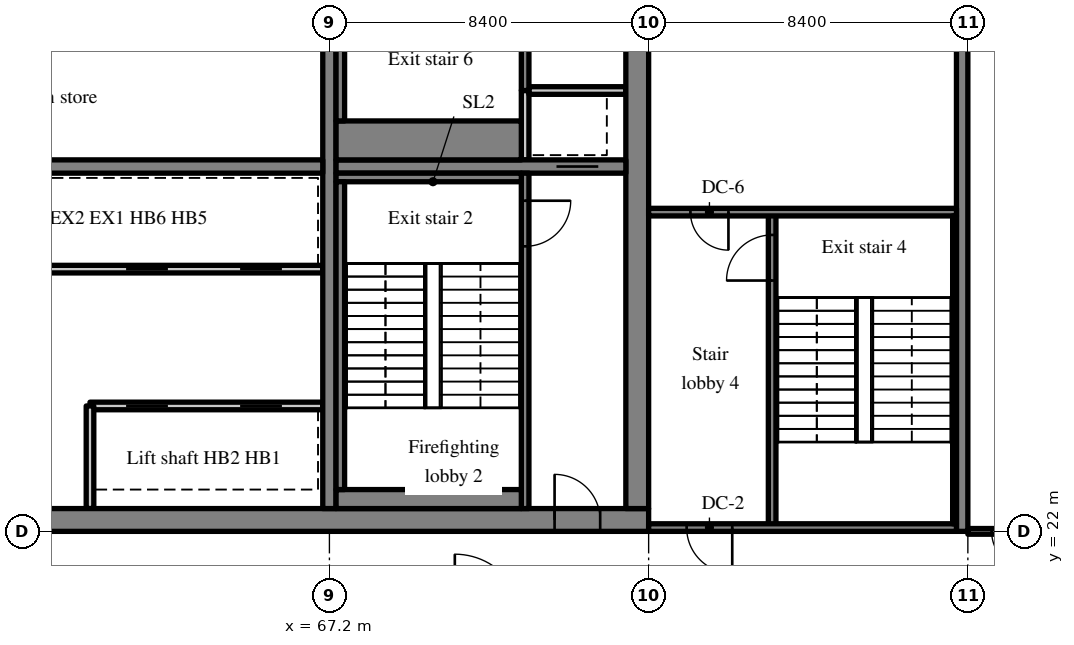
"""IFC4 building model, lengths in metres.
Left out: names, types, materials, properties, quantities, classifications, styles, units other than length and angle.
Written with IfcOpenShell. Run it as: python <this file> out.ifc"""

import sys

from ifc_helpers import new_model, si_unit, direction, frame, frame_2d, origin, place, context, subcontext, project, spatial, rectangle, extrude, source, transform, mapped, element, fill, save


model = new_model("IFC4")
c1 = context("Model", 3, precision=1e-05, world=origin(), true_north=direction((0.0, 1.0)))
c2 = subcontext(c1, "Body", "Model", "MODEL_VIEW")
j1 = project(units=[si_unit("LENGTHUNIT", "METRE"), si_unit("PLANEANGLEUNIT", "RADIAN")], contexts=[c1])
p1 = place(None, origin())
s1 = spatial("IfcSite", under=j1, at=p1, CompositionType="ELEMENT")
p2 = place(p1, origin())
s2 = spatial("IfcBuilding", under=s1, at=p2, CompositionType="ELEMENT")
p3 = place(p2, frame((0.0, 0.0, 225.7)))
s3 = spatial("IfcBuildingStorey", under=s2, at=p3, CompositionType="ELEMENT", Elevation=225.7)
m1 = source(origin(), c2, "Body", "SweptSolid", [
    extrude(rectangle(XDim=50.4, YDim=0.6, at=frame_2d((25.2, 0.0))), origin(), (0.0, 0.0, 1.0), 3.62),
])
p4 = place(p3, frame((25.2, 22.3, 0.0), z_axis=(0.0, 0.0, 1.0), x_axis=(1.0, 0.0, 0.0)))
e1 = element("IfcWall", 1, at=p4, inside=s3, PredefinedType="SHEAR", context=c2, shape_type="MappedRepresentation", body=[
    mapped(m1, transform((0.0, 0.0, 0.0), scale=1.0)),
])
m2 = source(origin(), c2, "Body", "SweptSolid", [
    extrude(rectangle(XDim=1.8, YDim=2.1, at=frame_2d((0.9, 1.05))), frame((0.0, 0.31, 0.0), z_axis=(0.0, -1.0, 0.0), x_axis=(1.0, 0.0, 0.0)), (0.0, 0.0, 1.0), 0.62),
])
p5 = place(p4, frame((15.9, 0.0, 0.0)))
e2 = element("IfcOpeningElement", 2, at=p5, cuts=e1, PredefinedType="OPENING", context=c2, shape_type="MappedRepresentation", body=[
    mapped(m2, transform((0.0, 0.0, 0.0), scale=1.0)),
])
m3 = source(origin(), c2, "Body", "SweptSolid", [
    extrude(rectangle(XDim=0.9, YDim=2.1, at=frame_2d((0.45, 1.05))), frame((0.0, 0.31, 0.0), z_axis=(0.0, -1.0, 0.0), x_axis=(1.0, 0.0, 0.0)), (0.0, 0.0, 1.0), 0.62),
])
p6 = place(p4, frame((11.187, 0.0, 0.0)))
e3 = element("IfcOpeningElement", 3, at=p6, cuts=e1, PredefinedType="OPENING", context=c2, shape_type="MappedRepresentation", body=[
    mapped(m3, transform((0.0, 0.0, 0.0), scale=1.0)),
])
p7 = place(p4, frame((21.513, 0.0, 0.0)))
e4 = element("IfcOpeningElement", 4, at=p7, cuts=e1, PredefinedType="OPENING", context=c2, shape_type="MappedRepresentation", body=[
    mapped(m3, transform((0.0, 0.0, 0.0), scale=1.0)),
])
p8 = place(p4, frame((32.7, 0.0, 0.0)))
e5 = element("IfcOpeningElement", 5, at=p8, cuts=e1, PredefinedType="OPENING", context=c2, shape_type="MappedRepresentation", body=[
    mapped(m2, transform((0.0, 0.0, 0.0), scale=1.0)),
])
m4 = source(origin(), c2, "Body", "SweptSolid", [
    extrude(rectangle(XDim=1.2, YDim=2.1, at=frame_2d((0.6, 1.05))), frame((0.0, 0.31, 0.0), z_axis=(0.0, -1.0, 0.0), x_axis=(1.0, 0.0, 0.0)), (0.0, 0.0, 1.0), 0.62),
])
p9 = place(p4, frame((6.488, 0.0, 0.0)))
e6 = element("IfcOpeningElement", 6, at=p9, cuts=e1, PredefinedType="OPENING", context=c2, shape_type="MappedRepresentation", body=[
    mapped(m4, transform((0.0, 0.0, 0.0), scale=1.0)),
])
p10 = place(p4, frame((47.925, 0.0, 0.0)))
e7 = element("IfcOpeningElement", 7, at=p10, cuts=e1, PredefinedType="OPENING", context=c2, shape_type="MappedRepresentation", body=[
    mapped(m4, transform((0.0, 0.0, 0.0), scale=1.0)),
])
m5 = source(origin(), c2, "Body", "SweptSolid", [
    extrude(rectangle(XDim=18.8, YDim=0.6, at=frame_2d((9.4, 0.0))), origin(), (0.0, 0.0, 1.0), 3.62),
])
p11 = place(p3, frame((75.3, 22.6, 0.0), z_axis=(0.0, 0.0, 1.0), x_axis=(0.0, 1.0, 0.0)))
e8 = element("IfcWall", 8, at=p11, inside=s3, PredefinedType="SHEAR", context=c2, shape_type="MappedRepresentation", body=[
    mapped(m5, transform((0.0, 0.0, 0.0), scale=1.0)),
])
p12 = place(p11, frame((12.8, 0.0, 0.0)))
e9 = element("IfcOpeningElement", 9, at=p12, cuts=e8, PredefinedType="OPENING", context=c2, shape_type="MappedRepresentation", body=[
    mapped(m4, transform((0.0, 0.0, 0.0), scale=1.0)),
])
m6 = source(origin(), c2, "Body", "SweptSolid", [
    extrude(rectangle(XDim=18.8, YDim=0.35, at=frame_2d((9.4, 0.0))), origin(), (0.0, 0.0, 1.0), 3.62),
])
p13 = place(p3, frame((67.2, 22.6, 0.0), z_axis=(0.0, 0.0, 1.0), x_axis=(0.0, 1.0, 0.0)))
e10 = element("IfcWall", 10, at=p13, inside=s3, PredefinedType="SHEAR", context=c2, shape_type="MappedRepresentation", body=[
    mapped(m6, transform((0.0, 0.0, 0.0), scale=1.0)),
])
m7 = source(origin(), c2, "Body", "SweptSolid", [
    extrude(rectangle(XDim=16.45, YDim=0.35, at=frame_2d((8.225, 0.0))), origin(), (0.0, 0.0, 1.0), 3.62),
])
p14 = place(p3, frame((50.575, 31.6, 0.0), z_axis=(0.0, 0.0, 1.0), x_axis=(1.0, 0.0, 0.0)))
e11 = element("IfcWall", 11, at=p14, inside=s3, PredefinedType="SHEAR", context=c2, shape_type="MappedRepresentation", body=[
    mapped(m7, transform((0.0, 0.0, 0.0), scale=1.0)),
])
m8 = source(origin(), c2, "Body", "SweptSolid", [
    extrude(rectangle(XDim=1.0, YDim=2.1, at=frame_2d((0.5, 1.05))), frame((0.0, 0.185, 0.0), z_axis=(0.0, -1.0, 0.0), x_axis=(1.0, 0.0, 0.0)), (0.0, 0.0, 1.0), 0.37),
])
p15 = place(p14, frame((0.613, 0.0, 0.0)))
e12 = element("IfcOpeningElement", 12, at=p15, cuts=e11, PredefinedType="OPENING", context=c2, shape_type="MappedRepresentation", body=[
    mapped(m8, transform((0.0, 0.0, 0.0), scale=1.0)),
])
m9 = source(origin(), c2, "Body", "SweptSolid", [
    extrude(rectangle(XDim=7.625, YDim=0.35, at=frame_2d((3.812, 0.0))), origin(), (0.0, 0.0, 1.0), 3.62),
])
p16 = place(p3, frame((67.375, 31.6, 0.0), z_axis=(0.0, 0.0, 1.0), x_axis=(1.0, 0.0, 0.0)))
e13 = element("IfcWall", 13, at=p16, inside=s3, PredefinedType="SHEAR", context=c2, shape_type="MappedRepresentation", body=[
    mapped(m9, transform((0.0, 0.0, 0.0), scale=1.0)),
])
m10 = source(origin(), c2, "Body", "SweptSolid", [
    extrude(rectangle(XDim=1.1, YDim=2.1, at=frame_2d((0.55, 1.05))), frame((0.0, 0.185, 0.0), z_axis=(0.0, -1.0, 0.0), x_axis=(1.0, 0.0, 0.0)), (0.0, 0.0, 1.0), 0.37),
])
p17 = place(p16, frame((5.8, 0.0, 0.0)))
e14 = element("IfcOpeningElement", 14, at=p17, cuts=e13, PredefinedType="OPENING", context=c2, shape_type="MappedRepresentation", body=[
    mapped(m10, transform((0.0, 0.0, 0.0), scale=1.0)),
])
m11 = source(origin(), c2, "Body", "SweptSolid", [
    extrude(rectangle(XDim=18.4, YDim=0.3, at=frame_2d((9.2, 0.0))), origin(), (0.0, 0.0, 1.0), 3.62),
])
p18 = place(p3, frame((83.85, 22.0, 0.0), z_axis=(0.0, 0.0, 1.0), x_axis=(0.0, 1.0, 0.0)))
e15 = element("IfcWall", 15, at=p18, inside=s3, PredefinedType="SHEAR", context=c2, shape_type="MappedRepresentation", body=[
    mapped(m11, transform((0.0, 0.0, 0.0), scale=1.0)),
])
m12 = source(origin(), c2, "Body", "SweptSolid", [
    extrude(rectangle(XDim=6.125, YDim=0.2, at=frame_2d((3.062, 0.0))), origin(), (0.0, 0.0, 1.0), 3.62),
])
p19 = place(p3, frame((67.025, 25.3, 0.0), z_axis=(0.0, 0.0, 1.0), x_axis=(-1.0, 0.0, 0.0)))
e16 = element("IfcWall", 16, at=p19, inside=s3, PredefinedType="SOLIDWALL", context=c2, shape_type="MappedRepresentation", body=[
    mapped(m12, transform((0.0, 0.0, 0.0), scale=1.0)),
])
m13 = source(origin(), c2, "Body", "SweptSolid", [
    extrude(rectangle(XDim=1.1, YDim=2.1, at=frame_2d((0.55, 1.05))), frame((0.0, 0.11, 0.0), z_axis=(0.0, -1.0, 0.0), x_axis=(1.0, 0.0, 0.0)), (0.0, 0.0, 1.0), 0.22),
])
p20 = place(p19, frame((1.075, 0.0, 0.0)))
e17 = element("IfcOpeningElement", 17, at=p20, cuts=e16, PredefinedType="OPENING", context=c2, shape_type="MappedRepresentation", body=[
    mapped(m13, transform((0.0, 0.0, 0.0), scale=1.0)),
])
p21 = place(p19, frame((4.075, 0.0, 0.0)))
e18 = element("IfcOpeningElement", 18, at=p21, cuts=e16, PredefinedType="OPENING", context=c2, shape_type="MappedRepresentation", body=[
    mapped(m13, transform((0.0, 0.0, 0.0), scale=1.0)),
])
m14 = source(origin(), c2, "Body", "SweptSolid", [
    extrude(rectangle(XDim=12.125, YDim=0.2, at=frame_2d((6.062, 0.0))), origin(), (0.0, 0.0, 1.0), 3.62),
])
p22 = place(p3, frame((67.025, 28.9, 0.0), z_axis=(0.0, 0.0, 1.0), x_axis=(-1.0, 0.0, 0.0)))
e19 = element("IfcWall", 19, at=p22, inside=s3, PredefinedType="SOLIDWALL", context=c2, shape_type="MappedRepresentation", body=[
    mapped(m14, transform((0.0, 0.0, 0.0), scale=1.0)),
])
p23 = place(p22, frame((1.075, 0.0, 0.0)))
e20 = element("IfcOpeningElement", 20, at=p23, cuts=e19, PredefinedType="OPENING", context=c2, shape_type="MappedRepresentation", body=[
    mapped(m13, transform((0.0, 0.0, 0.0), scale=1.0)),
])
p24 = place(p22, frame((4.075, 0.0, 0.0)))
e21 = element("IfcOpeningElement", 21, at=p24, cuts=e19, PredefinedType="OPENING", context=c2, shape_type="MappedRepresentation", body=[
    mapped(m13, transform((0.0, 0.0, 0.0), scale=1.0)),
])
m15 = source(origin(), c2, "Body", "SweptSolid", [
    extrude(rectangle(XDim=2.7, YDim=0.2, at=frame_2d((1.35, 0.0))), origin(), (0.0, 0.0, 1.0), 3.62),
])
p25 = place(p3, frame((60.9, 22.6, 0.0), z_axis=(0.0, 0.0, 1.0), x_axis=(0.0, 1.0, 0.0)))
e22 = element("IfcWall", 22, at=p25, inside=s3, PredefinedType="SOLIDWALL", context=c2, shape_type="MappedRepresentation", body=[
    mapped(m15, transform((0.0, 0.0, 0.0), scale=1.0)),
])
m16 = source(origin(), c2, "Body", "SweptSolid", [
    extrude(rectangle(XDim=8.825, YDim=0.2, at=frame_2d((4.413, 0.0))), origin(), (0.0, 0.0, 1.0), 3.62),
])
p26 = place(p3, frame((72.35, 22.6, 0.0), z_axis=(0.0, 0.0, 1.0), x_axis=(0.0, 1.0, 0.0)))
e23 = element("IfcWall", 23, at=p26, inside=s3, PredefinedType="SOLIDWALL", context=c2, shape_type="MappedRepresentation", body=[
    mapped(m16, transform((0.0, 0.0, 0.0), scale=1.0)),
])
m17 = source(origin(), c2, "Body", "SweptSolid", [
    extrude(rectangle(XDim=1.2, YDim=2.1, at=frame_2d((0.6, 1.05))), frame((0.0, 0.11, 0.0), z_axis=(0.0, -1.0, 0.0), x_axis=(1.0, 0.0, 0.0)), (0.0, 0.0, 1.0), 0.22),
])
p27 = place(p26, frame((6.9, 0.0, 0.0)))
e24 = element("IfcOpeningElement", 24, at=p27, cuts=e23, PredefinedType="OPENING", context=c2, shape_type="MappedRepresentation", body=[
    mapped(m17, transform((0.0, 0.0, 0.0), scale=1.0)),
])
m18 = source(origin(), c2, "Body", "SweptSolid", [
    extrude(rectangle(XDim=1.825, YDim=0.2, at=frame_2d((0.913, 0.0))), origin(), (0.0, 0.0, 1.0), 3.62),
])
p28 = place(p3, frame((72.35, 31.775, 0.0), z_axis=(0.0, 0.0, 1.0), x_axis=(0.0, 1.0, 0.0)))
e25 = element("IfcWall", 25, at=p28, inside=s3, PredefinedType="SOLIDWALL", context=c2, shape_type="MappedRepresentation", body=[
    mapped(m18, transform((0.0, 0.0, 0.0), scale=1.0)),
])
m19 = source(origin(), c2, "Body", "SweptSolid", [
    extrude(rectangle(XDim=2.55, YDim=0.2, at=frame_2d((1.275, 0.0))), origin(), (0.0, 0.0, 1.0), 3.62),
])
p29 = place(p3, frame((72.45, 33.6, 0.0), z_axis=(0.0, 0.0, 1.0), x_axis=(1.0, 0.0, 0.0)))
e26 = element("IfcWall", 26, at=p29, inside=s3, PredefinedType="SOLIDWALL", context=c2, shape_type="MappedRepresentation", body=[
    mapped(m19, transform((0.0, 0.0, 0.0), scale=1.0)),
])
m20 = source(origin(), c2, "Body", "SweptSolid", [
    extrude(rectangle(XDim=7.8, YDim=0.2, at=frame_2d((3.9, 0.0))), origin(), (0.0, 0.0, 1.0), 3.62),
])
p30 = place(p3, frame((72.35, 33.6, 0.0), z_axis=(0.0, 0.0, 1.0), x_axis=(0.0, 1.0, 0.0)))
e27 = element("IfcWall", 27, at=p30, inside=s3, PredefinedType="SOLIDWALL", context=c2, shape_type="MappedRepresentation", body=[
    mapped(m20, transform((0.0, 0.0, 0.0), scale=1.0)),
])
m21 = source(origin(), c2, "Body", "SweptSolid", [
    extrude(rectangle(XDim=1.8, YDim=2.1, at=frame_2d((0.9, 1.05))), frame((0.0, 0.11, 0.0), z_axis=(0.0, -1.0, 0.0), x_axis=(1.0, 0.0, 0.0)), (0.0, 0.0, 1.0), 0.22),
])
p31 = place(p30, frame((5.3, 0.0, 0.0)))
e28 = element("IfcOpeningElement", 28, at=p31, cuts=e27, PredefinedType="OPENING", context=c2, shape_type="MappedRepresentation", body=[
    mapped(m21, transform((0.0, 0.0, 0.0), scale=1.0)),
])
m22 = source(origin(), c2, "Body", "SweptSolid", [
    extrude(rectangle(XDim=8.3, YDim=0.2, at=frame_2d((4.15, 0.0))), origin(), (0.0, 0.0, 1.0), 3.62),
])
p32 = place(p3, frame((78.85, 22.1, 0.0), z_axis=(0.0, 0.0, 1.0), x_axis=(0.0, 1.0, 0.0)))
e29 = element("IfcWall", 29, at=p32, inside=s3, PredefinedType="SOLIDWALL", context=c2, shape_type="MappedRepresentation", body=[
    mapped(m22, transform((0.0, 0.0, 0.0), scale=1.0)),
])
p33 = place(p32, frame((6.5, 0.0, 0.0)))
e30 = element("IfcOpeningElement", 30, at=p33, cuts=e29, PredefinedType="OPENING", context=c2, shape_type="MappedRepresentation", body=[
    mapped(m17, transform((0.0, 0.0, 0.0), scale=1.0)),
])
m23 = source(origin(), c2, "Body", "SweptSolid", [
    extrude(rectangle(XDim=8.1, YDim=0.2, at=frame_2d((4.05, 0.0))), origin(), (0.0, 0.0, 1.0), 3.62),
])
p34 = place(p3, frame((83.7, 22.1, 0.0), z_axis=(0.0, 0.0, 1.0), x_axis=(-1.0, 0.0, 0.0)))
e31 = element("IfcWall", 31, at=p34, inside=s3, PredefinedType="SOLIDWALL", context=c2, shape_type="MappedRepresentation", body=[
    mapped(m23, transform((0.0, 0.0, 0.0), scale=1.0)),
])
p35 = place(p34, frame((5.9, 0.0, 0.0)))
e32 = element("IfcOpeningElement", 32, at=p35, cuts=e31, PredefinedType="OPENING", context=c2, shape_type="MappedRepresentation", body=[
    mapped(m17, transform((0.0, 0.0, 0.0), scale=1.0)),
])
p36 = place(p3, frame((83.7, 30.4, 0.0), z_axis=(0.0, 0.0, 1.0), x_axis=(-1.0, 0.0, 0.0)))
e33 = element("IfcWall", 33, at=p36, inside=s3, PredefinedType="SOLIDWALL", context=c2, shape_type="MappedRepresentation", body=[
    mapped(m23, transform((0.0, 0.0, 0.0), scale=1.0)),
])
m24 = source(origin(), c2, "Body", "SweptSolid", [
    extrude(rectangle(XDim=1.0, YDim=2.1, at=frame_2d((0.5, 1.05))), frame((0.0, 0.11, 0.0), z_axis=(0.0, -1.0, 0.0), x_axis=(1.0, 0.0, 0.0)), (0.0, 0.0, 1.0), 0.22),
])
p37 = place(p36, frame((6.0, 0.0, 0.0)))
e34 = element("IfcOpeningElement", 34, at=p37, cuts=e33, PredefinedType="OPENING", context=c2, shape_type="MappedRepresentation", body=[
    mapped(m24, transform((0.0, 0.0, 0.0), scale=1.0)),
])
m25 = source(origin(), c2, "Body", "SweptSolid", [
    extrude(rectangle(XDim=4.875, YDim=0.5, at=frame_2d((2.438, 0.0))), origin(), (0.0, 0.0, 1.0), 3.62),
])
p38 = place(p3, frame((67.375, 22.85, 0.0), z_axis=(0.0, 0.0, 1.0), x_axis=(1.0, 0.0, 0.0)))
e35 = element("IfcWall", 35, at=p38, inside=s3, PredefinedType="SOLIDWALL", context=c2, shape_type="MappedRepresentation", body=[
    mapped(m25, transform((0.0, 0.0, 0.0), scale=1.0)),
])
m26 = source(origin(), c2, "Body", "SweptSolid", [
    extrude(rectangle(XDim=4.875, YDim=0.225, at=frame_2d((2.438, 0.0))), origin(), (0.0, 0.0, 1.0), 3.62),
])
p39 = place(p3, frame((67.375, 31.312, 0.0), z_axis=(0.0, 0.0, 1.0), x_axis=(1.0, 0.0, 0.0)))
e36 = element("IfcWall", 36, at=p39, inside=s3, PredefinedType="SOLIDWALL", context=c2, shape_type="MappedRepresentation", body=[
    mapped(m26, transform((0.0, 0.0, 0.0), scale=1.0)),
])
m27 = source(origin(), c2, "Body", "SweptSolid", [
    extrude(rectangle(XDim=8.1, YDim=0.225, at=frame_2d((4.05, 0.0))), origin(), (0.0, 0.0, 1.0), 3.62),
])
p40 = place(p3, frame((67.487, 23.1, 0.0), z_axis=(0.0, 0.0, 1.0), x_axis=(0.0, 1.0, 0.0)))
e37 = element("IfcWall", 37, at=p40, inside=s3, PredefinedType="SOLIDWALL", context=c2, shape_type="MappedRepresentation", body=[
    mapped(m27, transform((0.0, 0.0, 0.0), scale=1.0)),
])
m28 = source(origin(), c2, "Body", "SweptSolid", [
    extrude(rectangle(XDim=4.875, YDim=1.025, at=frame_2d((2.438, 0.0))), origin(), (0.0, 0.0, 1.0), 3.62),
])
p41 = place(p3, frame((67.375, 32.287, 0.0), z_axis=(0.0, 0.0, 1.0), x_axis=(1.0, 0.0, 0.0)))
e38 = element("IfcWall", 38, at=p41, inside=s3, PredefinedType="SOLIDWALL", context=c2, shape_type="MappedRepresentation", body=[
    mapped(m28, transform((0.0, 0.0, 0.0), scale=1.0)),
])
p42 = place(p3, frame((67.487, 32.8, 0.0), z_axis=(0.0, 0.0, 1.0), x_axis=(0.0, 1.0, 0.0)))
e39 = element("IfcWall", 39, at=p42, inside=s3, PredefinedType="SOLIDWALL", context=c2, shape_type="MappedRepresentation", body=[
    mapped(m27, transform((0.0, 0.0, 0.0), scale=1.0)),
])
m29 = source(origin(), c2, "Body", "SweptSolid", [
    extrude(rectangle(XDim=8.1, YDim=0.1, at=frame_2d((4.05, 0.0))), origin(), (0.0, 0.0, 1.0), 3.62),
])
p43 = place(p3, frame((83.65, 22.2, 0.0), z_axis=(0.0, 0.0, 1.0), x_axis=(0.0, 1.0, 0.0)))
e40 = element("IfcWall", 40, at=p43, inside=s3, PredefinedType="SOLIDWALL", context=c2, shape_type="MappedRepresentation", body=[
    mapped(m29, transform((0.0, 0.0, 0.0), scale=1.0)),
])
m30 = source(origin(), c2, "Body", "SweptSolid", [
    extrude(rectangle(XDim=1.9, YDim=0.15, at=frame_2d((0.95, 0.0))), origin(), (0.0, 0.0, 1.0), 2.92),
])
p44 = place(p3, frame((84.0, 22.0, 0.0), z_axis=(0.0, 0.0, 1.0), x_axis=(1.0, 0.0, 0.0)))
e41 = element("IfcWall", 41, at=p44, inside=s3, PredefinedType="PARTITIONING", context=c2, shape_type="MappedRepresentation", body=[
    mapped(m30, transform((0.0, 0.0, 0.0), scale=1.0)),
])
m31 = source(origin(), c2, "Body", "SweptSolid", [
    extrude(rectangle(XDim=1.0, YDim=2.1, at=frame_2d((0.5, 1.05))), frame((0.0, 0.085, 0.0), z_axis=(0.0, -1.0, 0.0), x_axis=(1.0, 0.0, 0.0)), (0.0, 0.0, 1.0), 0.17),
])
p45 = place(p44, frame((0.625, 0.0, 0.0)))
e42 = element("IfcOpeningElement", 42, at=p45, cuts=e41, PredefinedType="OPENING", context=c2, shape_type="MappedRepresentation", body=[
    mapped(m31, transform((0.0, 0.0, 0.0), scale=1.0)),
])
m32 = source(origin(), c2, "Body", "SweptSolid", [
    extrude(rectangle(XDim=1.1, YDim=2.1, at=frame_2d((0.55, 1.05))), frame((0.0, 0.025, 0.0), z_axis=(0.0, -1.0, 0.0), x_axis=(1.0, 0.0, 0.0)), (0.0, 0.0, 1.0), 0.05),
])
p46 = place(p20, origin())
e43 = element("IfcDoor", 43, at=p46, inside=s3, OperationType="SLIDING_TO_RIGHT", PredefinedType="DOOR", context=c2, shape_type="MappedRepresentation", body=[
    mapped(m32, transform((0.0, 0.0, 0.0), scale=1.0)),
])
fill(e17, e43)
p47 = place(p21, origin())
e44 = element("IfcDoor", 44, at=p47, inside=s3, OperationType="SLIDING_TO_LEFT", PredefinedType="DOOR", context=c2, shape_type="MappedRepresentation", body=[
    mapped(m32, transform((0.0, 0.0, 0.0), scale=1.0)),
])
fill(e18, e44)
p48 = place(p23, origin())
e45 = element("IfcDoor", 45, at=p48, inside=s3, OperationType="SLIDING_TO_RIGHT", PredefinedType="DOOR", context=c2, shape_type="MappedRepresentation", body=[
    mapped(m32, transform((0.0, 0.0, 0.0), scale=1.0)),
])
fill(e20, e45)
p49 = place(p24, origin())
e46 = element("IfcDoor", 46, at=p49, inside=s3, OperationType="SLIDING_TO_LEFT", PredefinedType="DOOR", context=c2, shape_type="MappedRepresentation", body=[
    mapped(m32, transform((0.0, 0.0, 0.0), scale=1.0)),
])
fill(e21, e46)
m33 = source(origin(), c2, "Body", "SweptSolid", [
    extrude(rectangle(XDim=1.2, YDim=2.1, at=frame_2d((0.6, 1.05))), frame((0.0, 0.025, 0.0), z_axis=(0.0, -1.0, 0.0), x_axis=(1.0, 0.0, 0.0)), (0.0, 0.0, 1.0), 0.05),
])
p50 = place(p27, origin())
e47 = element("IfcDoor", 47, at=p50, inside=s3, OperationType="SINGLE_SWING_RIGHT", PredefinedType="DOOR", context=c2, shape_type="MappedRepresentation", body=[
    mapped(m33, transform((0.0, 0.0, 0.0), scale=1.0)),
])
fill(e24, e47)
m34 = source(origin(), c2, "Body", "SweptSolid", [
    extrude(rectangle(XDim=1.2, YDim=2.1, at=frame_2d((0.6, 1.05))), frame((0.0, 0.225, 0.0), z_axis=(0.0, -1.0, 0.0), x_axis=(1.0, 0.0, 0.0)), (0.0, 0.0, 1.0), 0.05),
])
p51 = place(p10, origin())
e48 = element("IfcDoor", 48, at=p51, inside=s3, OperationType="SINGLE_SWING_LEFT", PredefinedType="DOOR", context=c2, shape_type="MappedRepresentation", body=[
    mapped(m34, transform((0.0, 0.0, 0.0), scale=1.0)),
])
fill(e7, e48)
p52 = place(p17, origin())
e49 = element("IfcDoor", 49, at=p52, inside=s3, OperationType="SLIDING_TO_LEFT", PredefinedType="DOOR", context=c2, shape_type="MappedRepresentation", body=[
    mapped(m32, transform((0.0, 0.0, 0.0), scale=1.0)),
])
fill(e14, e49)
p53 = place(p33, origin())
e50 = element("IfcDoor", 50, at=p53, inside=s3, OperationType="SINGLE_SWING_LEFT", PredefinedType="DOOR", context=c2, shape_type="MappedRepresentation", body=[
    mapped(m33, transform((0.0, 0.0, 0.0), scale=1.0)),
])
fill(e30, e50)
p54 = place(p35, origin())
e51 = element("IfcDoor", 51, at=p54, inside=s3, OperationType="SINGLE_SWING_LEFT", PredefinedType="DOOR", context=c2, shape_type="MappedRepresentation", body=[
    mapped(m33, transform((0.0, 0.0, 0.0), scale=1.0)),
])
fill(e32, e51)
m35 = source(origin(), c2, "Body", "SweptSolid", [
    extrude(rectangle(XDim=1.0, YDim=2.1, at=frame_2d((0.5, 1.05))), frame((0.0, 0.025, 0.0), z_axis=(0.0, -1.0, 0.0), x_axis=(1.0, 0.0, 0.0)), (0.0, 0.0, 1.0), 0.05),
])
p55 = place(p37, origin())
e52 = element("IfcDoor", 52, at=p55, inside=s3, OperationType="SINGLE_SWING_LEFT", PredefinedType="DOOR", context=c2, shape_type="MappedRepresentation", body=[
    mapped(m35, transform((0.0, 0.0, 0.0), scale=1.0)),
])
fill(e34, e52)
p56 = place(p45, origin())
e53 = element("IfcDoor", 53, at=p56, inside=s3, OperationType="SINGLE_SWING_RIGHT", PredefinedType="DOOR", context=c2, shape_type="MappedRepresentation", body=[
    mapped(m35, transform((0.0, 0.0, 0.0), scale=1.0)),
])
fill(e42, e53)
save(model, sys.argv[1])
